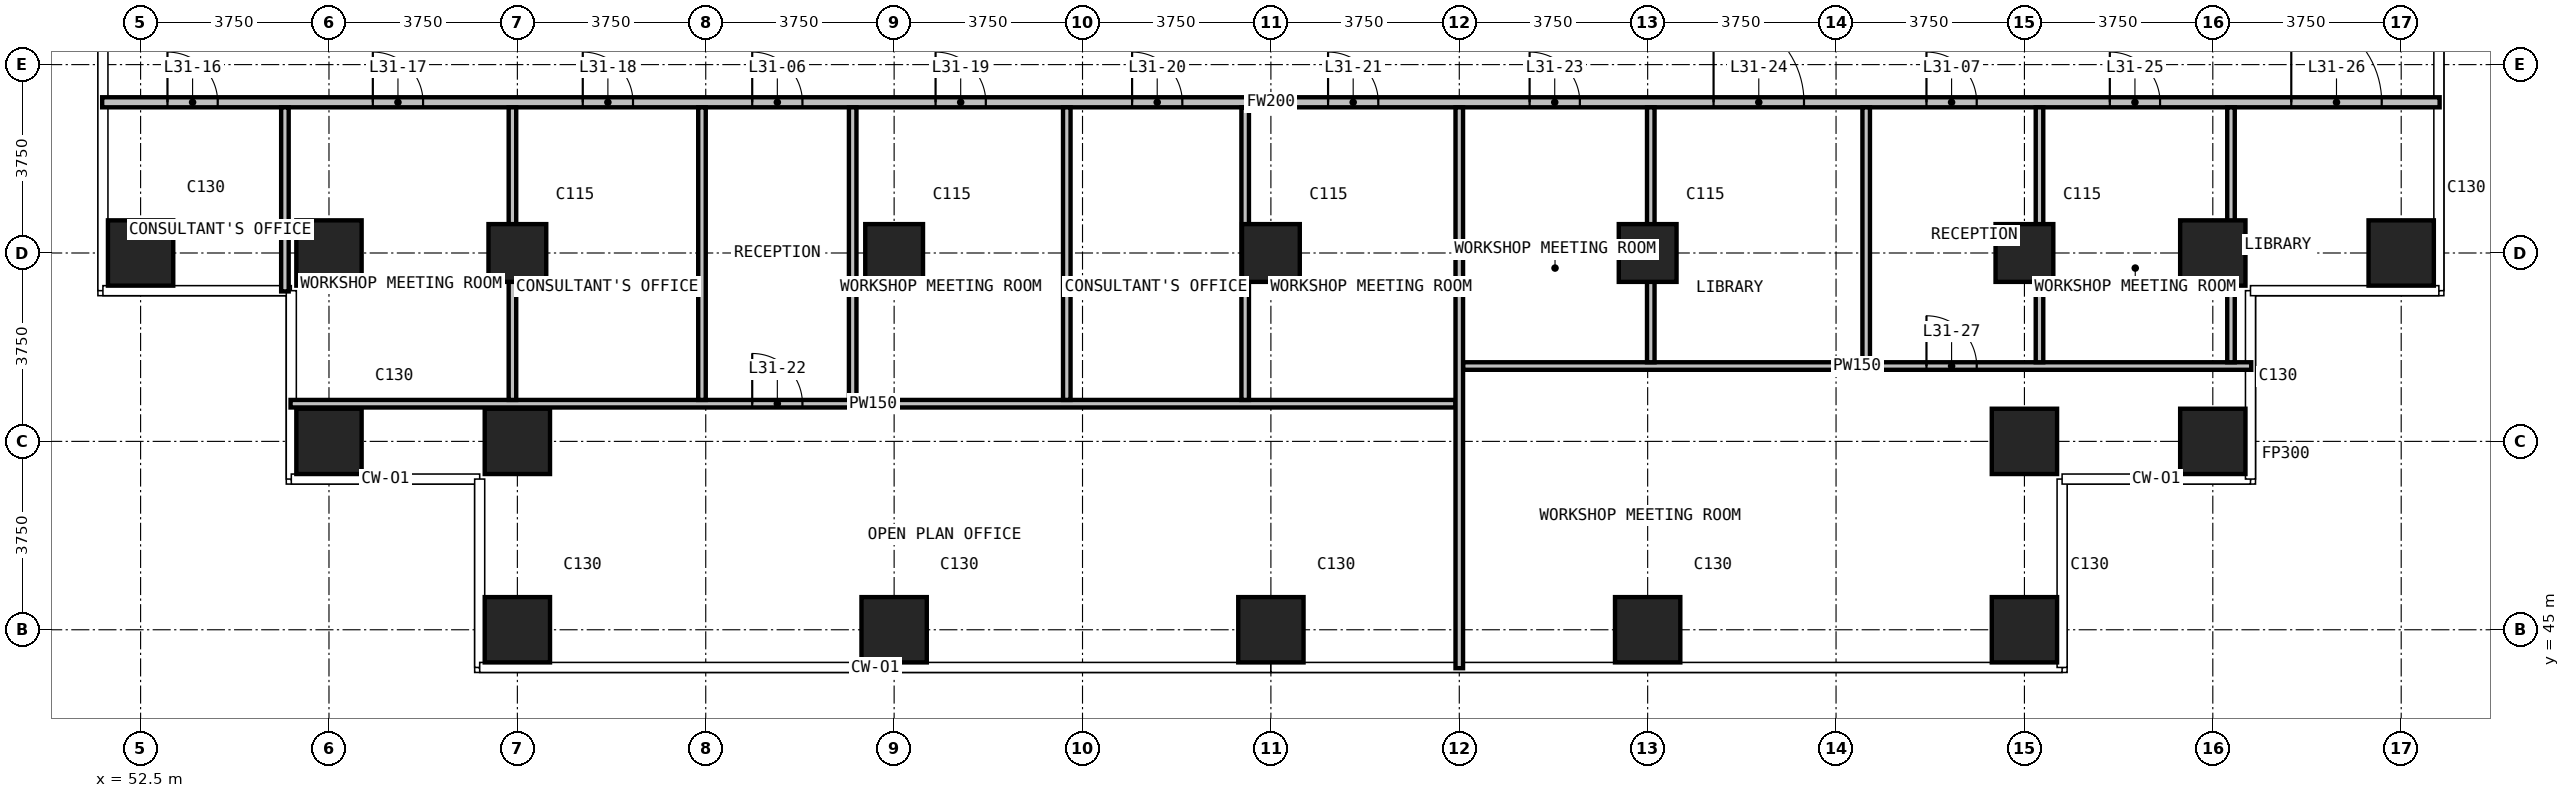
"""IFC4 building model, lengths in metres.
Left out: names, types, materials, properties, quantities, classifications, styles, units other than length and angle.
Written with IfcOpenShell. Run it as: python <this file> out.ifc"""

import sys

from ifc_helpers import new_model, si_unit, direction, frame, frame_2d, origin, origin_2d, place, context, subcontext, project, spatial, rectangle, extrude, element, fill, save


model = new_model("IFC4")
c1 = context("Model", 3, precision=1e-05, world=origin(), true_north=direction((0.0, 1.0)))
c2 = subcontext(c1, "Body", "Model", "MODEL_VIEW")
j1 = project(units=[si_unit("LENGTHUNIT", "METRE"), si_unit("PLANEANGLEUNIT", "RADIAN")], contexts=[c1])
p1 = place(None, origin())
s1 = spatial("IfcSite", under=j1, at=p1, CompositionType="ELEMENT")
p2 = place(p1, origin())
s2 = spatial("IfcBuilding", under=s1, at=p2, CompositionType="ELEMENT")
p3 = place(p2, frame((0.0, 0.0, 125.2)))
s3 = spatial("IfcBuildingStorey", under=s2, at=p3, CompositionType="ELEMENT", Elevation=125.2)
for number, where, z_axis, x_axis in (
    (1, (52.5, 52.5, 0.0), (0.0, 0.0, 1.0), (1.0, 0.0, 0.0)),
    (2, (56.25, 48.75, 0.0), (0.0, 0.0, 1.0), (1.0, 0.0, 0.0)),
    (3, (56.25, 52.5, 0.0), (0.0, 0.0, 1.0), (1.0, 0.0, 0.0)),
    (4, (60.0, 45.0, 0.0), (0.0, 0.0, 1.0), (1.0, 0.0, 0.0)),
    (5, (60.0, 48.75, 0.0), (0.0, 0.0, 1.0), (1.0, 0.0, 0.0)),
):
    element("IfcColumn", number, at=place(p3, frame(where, z_axis=z_axis, x_axis=x_axis)), inside=s3, PredefinedType="COLUMN", context=c2, shape_type="SweptSolid", body=[
        extrude(rectangle(XDim=1.3, YDim=1.3, at=origin_2d()), origin(), (0.0, 0.0, 1.0), 3.6),
    ])
p4 = place(p3, frame((60.0, 52.5, 0.0), z_axis=(0.0, 0.0, 1.0), x_axis=(1.0, 0.0, 0.0)))
e6 = element("IfcColumn", 6, at=p4, inside=s3, PredefinedType="COLUMN", context=c2, shape_type="SweptSolid", body=[
    extrude(rectangle(XDim=1.15, YDim=1.15, at=origin_2d()), origin(), (0.0, 0.0, 1.0), 3.6),
])
p5 = place(p3, frame((67.5, 45.0, 0.0), z_axis=(0.0, 0.0, 1.0), x_axis=(1.0, 0.0, 0.0)))
e7 = element("IfcColumn", 7, at=p5, inside=s3, PredefinedType="COLUMN", context=c2, shape_type="SweptSolid", body=[
    extrude(rectangle(XDim=1.3, YDim=1.3, at=origin_2d()), origin(), (0.0, 0.0, 1.0), 3.6),
])
p6 = place(p3, frame((67.5, 52.5, 0.0), z_axis=(0.0, 0.0, 1.0), x_axis=(1.0, 0.0, 0.0)))
e8 = element("IfcColumn", 8, at=p6, inside=s3, PredefinedType="COLUMN", context=c2, shape_type="SweptSolid", body=[
    extrude(rectangle(XDim=1.15, YDim=1.15, at=origin_2d()), origin(), (0.0, 0.0, 1.0), 3.6),
])
p7 = place(p3, frame((75.0, 45.0, 0.0), z_axis=(0.0, 0.0, 1.0), x_axis=(1.0, 0.0, 0.0)))
e9 = element("IfcColumn", 9, at=p7, inside=s3, PredefinedType="COLUMN", context=c2, shape_type="SweptSolid", body=[
    extrude(rectangle(XDim=1.3, YDim=1.3, at=origin_2d()), origin(), (0.0, 0.0, 1.0), 3.6),
])
p8 = place(p3, frame((75.0, 52.5, 0.0), z_axis=(0.0, 0.0, 1.0), x_axis=(1.0, 0.0, 0.0)))
e10 = element("IfcColumn", 10, at=p8, inside=s3, PredefinedType="COLUMN", context=c2, shape_type="SweptSolid", body=[
    extrude(rectangle(XDim=1.15, YDim=1.15, at=origin_2d()), origin(), (0.0, 0.0, 1.0), 3.6),
])
p9 = place(p3, frame((82.5, 45.0, 0.0), z_axis=(0.0, 0.0, 1.0), x_axis=(1.0, 0.0, 0.0)))
e11 = element("IfcColumn", 11, at=p9, inside=s3, PredefinedType="COLUMN", context=c2, shape_type="SweptSolid", body=[
    extrude(rectangle(XDim=1.3, YDim=1.3, at=origin_2d()), origin(), (0.0, 0.0, 1.0), 3.6),
])
p10 = place(p3, frame((82.5, 52.5, 0.0), z_axis=(0.0, 0.0, 1.0), x_axis=(1.0, 0.0, 0.0)))
e12 = element("IfcColumn", 12, at=p10, inside=s3, PredefinedType="COLUMN", context=c2, shape_type="SweptSolid", body=[
    extrude(rectangle(XDim=1.15, YDim=1.15, at=origin_2d()), origin(), (0.0, 0.0, 1.0), 3.6),
])
for number, where, z_axis, x_axis in (
    (13, (90.0, 45.0, 0.0), (0.0, 0.0, 1.0), (1.0, 0.0, 0.0)),
    (14, (90.0, 48.75, 0.0), (0.0, 0.0, 1.0), (1.0, 0.0, 0.0)),
):
    element("IfcColumn", number, at=place(p3, frame(where, z_axis=z_axis, x_axis=x_axis)), inside=s3, PredefinedType="COLUMN", context=c2, shape_type="SweptSolid", body=[
        extrude(rectangle(XDim=1.3, YDim=1.3, at=origin_2d()), origin(), (0.0, 0.0, 1.0), 3.6),
    ])
p11 = place(p3, frame((90.0, 52.5, 0.0), z_axis=(0.0, 0.0, 1.0), x_axis=(1.0, 0.0, 0.0)))
e15 = element("IfcColumn", 15, at=p11, inside=s3, PredefinedType="COLUMN", context=c2, shape_type="SweptSolid", body=[
    extrude(rectangle(XDim=1.15, YDim=1.15, at=origin_2d()), origin(), (0.0, 0.0, 1.0), 3.6),
])
for number, where, z_axis, x_axis in (
    (16, (93.75, 48.75, 0.0), (0.0, 0.0, 1.0), (1.0, 0.0, 0.0)),
    (17, (93.75, 52.5, 0.0), (0.0, 0.0, 1.0), (1.0, 0.0, 0.0)),
    (18, (97.5, 52.5, 0.0), (0.0, 0.0, 1.0), (1.0, 0.0, 0.0)),
):
    element("IfcColumn", number, at=place(p3, frame(where, z_axis=z_axis, x_axis=x_axis)), inside=s3, PredefinedType="COLUMN", context=c2, shape_type="SweptSolid", body=[
        extrude(rectangle(XDim=1.3, YDim=1.3, at=origin_2d()), origin(), (0.0, 0.0, 1.0), 3.6),
    ])
p12 = place(p3, frame((51.735, 55.5, 0.0), z_axis=(0.0, 0.0, 1.0), x_axis=(1.0, 0.0, 0.0)))
e19 = element("IfcWall", 19, at=p12, inside=s3, PredefinedType="PARTITIONING", context=c2, shape_type="SweptSolid", body=[
    extrude(rectangle(XDim=46.53, YDim=0.2, at=frame_2d((23.265, 0.0))), origin(), (0.0, 0.0, 1.0), 3.3),
])
p13 = place(p12, frame((12.94, 0.0, 0.0)))
e20 = element("IfcOpeningElement", 20, at=p13, cuts=e19, PredefinedType="OPENING", context=c2, shape_type="SweptSolid", body=[
    extrude(rectangle(XDim=1.0, YDim=2.2, at=frame_2d((0.5, 1.1))), frame((0.0, 0.11, 0.0), z_axis=(0.0, -1.0, 0.0), x_axis=(1.0, 0.0, 0.0)), (0.0, 0.0, 1.0), 0.22),
])
p14 = place(p12, frame((36.315, 0.0, 0.0)))
e21 = element("IfcOpeningElement", 21, at=p14, cuts=e19, PredefinedType="OPENING", context=c2, shape_type="SweptSolid", body=[
    extrude(rectangle(XDim=1.0, YDim=2.2, at=frame_2d((0.5, 1.1))), frame((0.0, 0.11, 0.0), z_axis=(0.0, -1.0, 0.0), x_axis=(1.0, 0.0, 0.0)), (0.0, 0.0, 1.0), 0.22),
])
p15 = place(p12, frame((1.3, 0.0, 0.0)))
e22 = element("IfcOpeningElement", 22, at=p15, cuts=e19, PredefinedType="OPENING", context=c2, shape_type="SweptSolid", body=[
    extrude(rectangle(XDim=1.0, YDim=2.2, at=frame_2d((0.5, 1.1))), frame((0.0, 0.11, 0.0), z_axis=(0.0, -1.0, 0.0), x_axis=(1.0, 0.0, 0.0)), (0.0, 0.0, 1.0), 0.22),
])
p16 = place(p12, frame((5.388, 0.0, 0.0)))
e23 = element("IfcOpeningElement", 23, at=p16, cuts=e19, PredefinedType="OPENING", context=c2, shape_type="SweptSolid", body=[
    extrude(rectangle(XDim=1.0, YDim=2.2, at=frame_2d((0.5, 1.1))), frame((0.0, 0.11, 0.0), z_axis=(0.0, -1.0, 0.0), x_axis=(1.0, 0.0, 0.0)), (0.0, 0.0, 1.0), 0.22),
])
p17 = place(p12, frame((9.567, 0.0, 0.0)))
e24 = element("IfcOpeningElement", 24, at=p17, cuts=e19, PredefinedType="OPENING", context=c2, shape_type="SweptSolid", body=[
    extrude(rectangle(XDim=1.0, YDim=2.2, at=frame_2d((0.5, 1.1))), frame((0.0, 0.11, 0.0), z_axis=(0.0, -1.0, 0.0), x_axis=(1.0, 0.0, 0.0)), (0.0, 0.0, 1.0), 0.22),
])
p18 = place(p12, frame((16.59, 0.0, 0.0)))
e25 = element("IfcOpeningElement", 25, at=p18, cuts=e19, PredefinedType="OPENING", context=c2, shape_type="SweptSolid", body=[
    extrude(rectangle(XDim=1.0, YDim=2.2, at=frame_2d((0.5, 1.1))), frame((0.0, 0.11, 0.0), z_axis=(0.0, -1.0, 0.0), x_axis=(1.0, 0.0, 0.0)), (0.0, 0.0, 1.0), 0.22),
])
p19 = place(p12, frame((20.502, 0.0, 0.0)))
e26 = element("IfcOpeningElement", 26, at=p19, cuts=e19, PredefinedType="OPENING", context=c2, shape_type="SweptSolid", body=[
    extrude(rectangle(XDim=1.0, YDim=2.2, at=frame_2d((0.5, 1.1))), frame((0.0, 0.11, 0.0), z_axis=(0.0, -1.0, 0.0), x_axis=(1.0, 0.0, 0.0)), (0.0, 0.0, 1.0), 0.22),
])
p20 = place(p12, frame((24.403, 0.0, 0.0)))
e27 = element("IfcOpeningElement", 27, at=p20, cuts=e19, PredefinedType="OPENING", context=c2, shape_type="SweptSolid", body=[
    extrude(rectangle(XDim=1.0, YDim=2.2, at=frame_2d((0.5, 1.1))), frame((0.0, 0.11, 0.0), z_axis=(0.0, -1.0, 0.0), x_axis=(1.0, 0.0, 0.0)), (0.0, 0.0, 1.0), 0.22),
])
p21 = place(p12, frame((28.415, 0.0, 0.0)))
e28 = element("IfcOpeningElement", 28, at=p21, cuts=e19, PredefinedType="OPENING", context=c2, shape_type="SweptSolid", body=[
    extrude(rectangle(XDim=1.0, YDim=2.2, at=frame_2d((0.5, 1.1))), frame((0.0, 0.11, 0.0), z_axis=(0.0, -1.0, 0.0), x_axis=(1.0, 0.0, 0.0)), (0.0, 0.0, 1.0), 0.22),
])
p22 = place(p12, frame((32.077, 0.0, 0.0)))
e29 = element("IfcOpeningElement", 29, at=p22, cuts=e19, PredefinedType="OPENING", context=c2, shape_type="SweptSolid", body=[
    extrude(rectangle(XDim=1.8, YDim=2.2, at=frame_2d((0.9, 1.1))), frame((0.0, 0.11, 0.0), z_axis=(0.0, -1.0, 0.0), x_axis=(1.0, 0.0, 0.0)), (0.0, 0.0, 1.0), 0.22),
])
p23 = place(p12, frame((39.965, 0.0, 0.0)))
e30 = element("IfcOpeningElement", 30, at=p23, cuts=e19, PredefinedType="OPENING", context=c2, shape_type="SweptSolid", body=[
    extrude(rectangle(XDim=1.0, YDim=2.2, at=frame_2d((0.5, 1.1))), frame((0.0, 0.11, 0.0), z_axis=(0.0, -1.0, 0.0), x_axis=(1.0, 0.0, 0.0)), (0.0, 0.0, 1.0), 0.22),
])
p24 = place(p12, frame((43.577, 0.0, 0.0)))
e31 = element("IfcOpeningElement", 31, at=p24, cuts=e19, PredefinedType="OPENING", context=c2, shape_type="SweptSolid", body=[
    extrude(rectangle(XDim=1.8, YDim=2.2, at=frame_2d((0.9, 1.1))), frame((0.0, 0.11, 0.0), z_axis=(0.0, -1.0, 0.0), x_axis=(1.0, 0.0, 0.0)), (0.0, 0.0, 1.0), 0.22),
])
p25 = place(p3, frame((55.485, 49.5, 0.0), z_axis=(0.0, 0.0, 1.0), x_axis=(1.0, 0.0, 0.0)))
e32 = element("IfcWall", 32, at=p25, inside=s3, PredefinedType="PARTITIONING", context=c2, shape_type="SweptSolid", body=[
    extrude(rectangle(XDim=23.19, YDim=0.15, at=frame_2d((11.595, 0.0))), origin(), (0.0, 0.0, 1.0), 3.3),
])
p26 = place(p25, frame((9.19, 0.0, 0.0)))
e33 = element("IfcOpeningElement", 33, at=p26, cuts=e32, PredefinedType="OPENING", context=c2, shape_type="SweptSolid", body=[
    extrude(rectangle(XDim=1.0, YDim=2.2, at=frame_2d((0.5, 1.1))), frame((0.0, 0.085, 0.0), z_axis=(0.0, -1.0, 0.0), x_axis=(1.0, 0.0, 0.0)), (0.0, 0.0, 1.0), 0.17),
])
p27 = place(p3, frame((78.825, 50.25, 0.0), z_axis=(0.0, 0.0, 1.0), x_axis=(1.0, 0.0, 0.0)))
e34 = element("IfcWall", 34, at=p27, inside=s3, PredefinedType="PARTITIONING", context=c2, shape_type="SweptSolid", body=[
    extrude(rectangle(XDim=15.69, YDim=0.15, at=frame_2d((7.845, 0.0))), origin(), (0.0, 0.0, 1.0), 3.3),
])
p28 = place(p27, frame((9.225, 0.0, 0.0)))
e35 = element("IfcOpeningElement", 35, at=p28, cuts=e34, PredefinedType="OPENING", context=c2, shape_type="SweptSolid", body=[
    extrude(rectangle(XDim=1.0, YDim=2.2, at=frame_2d((0.5, 1.1))), frame((0.0, 0.085, 0.0), z_axis=(0.0, -1.0, 0.0), x_axis=(1.0, 0.0, 0.0)), (0.0, 0.0, 1.0), 0.17),
])
p29 = place(p3, frame((55.373, 51.735, 0.0), z_axis=(0.0, 0.0, 1.0), x_axis=(0.0, 1.0, 0.0)))
e36 = element("IfcWall", 36, at=p29, inside=s3, PredefinedType="PARTITIONING", context=c2, shape_type="SweptSolid", body=[
    extrude(rectangle(XDim=3.665, YDim=0.15, at=frame_2d((1.833, 0.0))), origin(), (0.0, 0.0, 1.0), 3.3),
])
for number, where, z_axis, x_axis in (
    (37, (59.902, 49.575, 0.0), (0.0, 0.0, 1.0), (0.0, 1.0, 0.0)),
    (38, (63.675, 49.575, 0.0), (0.0, 0.0, 1.0), (0.0, 1.0, 0.0)),
    (39, (66.675, 49.575, 0.0), (0.0, 0.0, 1.0), (0.0, 1.0, 0.0)),
    (40, (70.937, 49.575, 0.0), (0.0, 0.0, 1.0), (0.0, 1.0, 0.0)),
    (41, (74.488, 49.575, 0.0), (0.0, 0.0, 1.0), (0.0, 1.0, 0.0)),
):
    element("IfcWall", number, at=place(p3, frame(where, z_axis=z_axis, x_axis=x_axis)), inside=s3, PredefinedType="PARTITIONING", context=c2, shape_type="SweptSolid", body=[
        extrude(rectangle(XDim=5.825, YDim=0.15, at=frame_2d((2.913, 0.0))), origin(), (0.0, 0.0, 1.0), 3.3),
    ])
p30 = place(p3, frame((78.75, 44.235, 0.0), z_axis=(0.0, 0.0, 1.0), x_axis=(0.0, 1.0, 0.0)))
e42 = element("IfcWall", 42, at=p30, inside=s3, PredefinedType="PARTITIONING", context=c2, shape_type="SweptSolid", body=[
    extrude(rectangle(XDim=11.165, YDim=0.15, at=frame_2d((5.583, 0.0))), origin(), (0.0, 0.0, 1.0), 3.3),
])
for number, where, z_axis, x_axis in (
    (43, (82.562, 50.325, 0.0), (0.0, 0.0, 1.0), (0.0, 1.0, 0.0)),
    (44, (86.85, 50.325, 0.0), (0.0, 0.0, 1.0), (0.0, 1.0, 0.0)),
    (45, (90.3, 50.325, 0.0), (0.0, 0.0, 1.0), (0.0, 1.0, 0.0)),
    (46, (94.112, 50.325, 0.0), (0.0, 0.0, 1.0), (0.0, 1.0, 0.0)),
):
    element("IfcWall", number, at=place(p3, frame(where, z_axis=z_axis, x_axis=x_axis)), inside=s3, PredefinedType="PARTITIONING", context=c2, shape_type="SweptSolid", body=[
        extrude(rectangle(XDim=5.075, YDim=0.15, at=frame_2d((2.538, 0.0))), origin(), (0.0, 0.0, 1.0), 3.3),
    ])
p31 = place(p13, origin())
e47 = element("IfcDoor", 47, at=p31, inside=s3, OperationType="SINGLE_SWING_RIGHT", PredefinedType="DOOR", context=c2, shape_type="SweptSolid", body=[
    extrude(rectangle(XDim=1.0, YDim=2.2, at=frame_2d((0.5, 1.1))), frame((0.0, 0.025, 0.0), z_axis=(0.0, -1.0, 0.0), x_axis=(1.0, 0.0, 0.0)), (0.0, 0.0, 1.0), 0.05),
])
fill(e20, e47)
p32 = place(p14, origin())
e48 = element("IfcDoor", 48, at=p32, inside=s3, OperationType="SINGLE_SWING_LEFT", PredefinedType="DOOR", context=c2, shape_type="SweptSolid", body=[
    extrude(rectangle(XDim=1.0, YDim=2.2, at=frame_2d((0.5, 1.1))), frame((0.0, 0.025, 0.0), z_axis=(0.0, -1.0, 0.0), x_axis=(1.0, 0.0, 0.0)), (0.0, 0.0, 1.0), 0.05),
])
fill(e21, e48)
p33 = place(p15, origin())
e49 = element("IfcDoor", 49, at=p33, inside=s3, OperationType="SINGLE_SWING_LEFT", PredefinedType="DOOR", context=c2, shape_type="SweptSolid", body=[
    extrude(rectangle(XDim=1.0, YDim=2.2, at=frame_2d((0.5, 1.1))), frame((0.0, 0.025, 0.0), z_axis=(0.0, -1.0, 0.0), x_axis=(1.0, 0.0, 0.0)), (0.0, 0.0, 1.0), 0.05),
])
fill(e22, e49)
p34 = place(p16, origin())
e50 = element("IfcDoor", 50, at=p34, inside=s3, OperationType="SINGLE_SWING_RIGHT", PredefinedType="DOOR", context=c2, shape_type="SweptSolid", body=[
    extrude(rectangle(XDim=1.0, YDim=2.2, at=frame_2d((0.5, 1.1))), frame((0.0, 0.025, 0.0), z_axis=(0.0, -1.0, 0.0), x_axis=(1.0, 0.0, 0.0)), (0.0, 0.0, 1.0), 0.05),
])
fill(e23, e50)
p35 = place(p17, origin())
e51 = element("IfcDoor", 51, at=p35, inside=s3, OperationType="SINGLE_SWING_RIGHT", PredefinedType="DOOR", context=c2, shape_type="SweptSolid", body=[
    extrude(rectangle(XDim=1.0, YDim=2.2, at=frame_2d((0.5, 1.1))), frame((0.0, 0.025, 0.0), z_axis=(0.0, -1.0, 0.0), x_axis=(1.0, 0.0, 0.0)), (0.0, 0.0, 1.0), 0.05),
])
fill(e24, e51)
p36 = place(p18, origin())
e52 = element("IfcDoor", 52, at=p36, inside=s3, OperationType="SINGLE_SWING_LEFT", PredefinedType="DOOR", context=c2, shape_type="SweptSolid", body=[
    extrude(rectangle(XDim=1.0, YDim=2.2, at=frame_2d((0.5, 1.1))), frame((0.0, 0.025, 0.0), z_axis=(0.0, -1.0, 0.0), x_axis=(1.0, 0.0, 0.0)), (0.0, 0.0, 1.0), 0.05),
])
fill(e25, e52)
p37 = place(p19, origin())
e53 = element("IfcDoor", 53, at=p37, inside=s3, OperationType="SINGLE_SWING_LEFT", PredefinedType="DOOR", context=c2, shape_type="SweptSolid", body=[
    extrude(rectangle(XDim=1.0, YDim=2.2, at=frame_2d((0.5, 1.1))), frame((0.0, 0.025, 0.0), z_axis=(0.0, -1.0, 0.0), x_axis=(1.0, 0.0, 0.0)), (0.0, 0.0, 1.0), 0.05),
])
fill(e26, e53)
p38 = place(p20, origin())
e54 = element("IfcDoor", 54, at=p38, inside=s3, OperationType="SINGLE_SWING_LEFT", PredefinedType="DOOR", context=c2, shape_type="SweptSolid", body=[
    extrude(rectangle(XDim=1.0, YDim=2.2, at=frame_2d((0.5, 1.1))), frame((0.0, 0.025, 0.0), z_axis=(0.0, -1.0, 0.0), x_axis=(1.0, 0.0, 0.0)), (0.0, 0.0, 1.0), 0.05),
])
fill(e27, e54)
p39 = place(p26, origin())
e55 = element("IfcDoor", 55, at=p39, inside=s3, OperationType="SINGLE_SWING_LEFT", PredefinedType="DOOR", context=c2, shape_type="SweptSolid", body=[
    extrude(rectangle(XDim=1.0, YDim=2.2, at=frame_2d((0.5, 1.1))), frame((0.0, 0.025, 0.0), z_axis=(0.0, -1.0, 0.0), x_axis=(1.0, 0.0, 0.0)), (0.0, 0.0, 1.0), 0.05),
])
fill(e33, e55)
p40 = place(p21, origin())
e56 = element("IfcDoor", 56, at=p40, inside=s3, OperationType="SINGLE_SWING_LEFT", PredefinedType="DOOR", context=c2, shape_type="SweptSolid", body=[
    extrude(rectangle(XDim=1.0, YDim=2.2, at=frame_2d((0.5, 1.1))), frame((0.0, 0.025, 0.0), z_axis=(0.0, -1.0, 0.0), x_axis=(1.0, 0.0, 0.0)), (0.0, 0.0, 1.0), 0.05),
])
fill(e28, e56)
p41 = place(p22, origin())
e57 = element("IfcDoor", 57, at=p41, inside=s3, OperationType="DOUBLE_DOOR_SINGLE_SWING", PredefinedType="DOOR", context=c2, shape_type="SweptSolid", body=[
    extrude(rectangle(XDim=1.8, YDim=2.2, at=frame_2d((0.9, 1.1))), frame((0.0, 0.025, 0.0), z_axis=(0.0, -1.0, 0.0), x_axis=(1.0, 0.0, 0.0)), (0.0, 0.0, 1.0), 0.05),
])
fill(e29, e57)
p42 = place(p23, origin())
e58 = element("IfcDoor", 58, at=p42, inside=s3, OperationType="SINGLE_SWING_LEFT", PredefinedType="DOOR", context=c2, shape_type="SweptSolid", body=[
    extrude(rectangle(XDim=1.0, YDim=2.2, at=frame_2d((0.5, 1.1))), frame((0.0, 0.025, 0.0), z_axis=(0.0, -1.0, 0.0), x_axis=(1.0, 0.0, 0.0)), (0.0, 0.0, 1.0), 0.05),
])
fill(e30, e58)
p43 = place(p24, origin())
e59 = element("IfcDoor", 59, at=p43, inside=s3, OperationType="DOUBLE_DOOR_SINGLE_SWING", PredefinedType="DOOR", context=c2, shape_type="SweptSolid", body=[
    extrude(rectangle(XDim=1.8, YDim=2.2, at=frame_2d((0.9, 1.1))), frame((0.0, 0.025, 0.0), z_axis=(0.0, -1.0, 0.0), x_axis=(1.0, 0.0, 0.0)), (0.0, 0.0, 1.0), 0.05),
])
fill(e31, e59)
p44 = place(p28, origin())
e60 = element("IfcDoor", 60, at=p44, inside=s3, OperationType="SINGLE_SWING_LEFT", PredefinedType="DOOR", context=c2, shape_type="SweptSolid", body=[
    extrude(rectangle(XDim=1.0, YDim=2.2, at=frame_2d((0.5, 1.1))), frame((0.0, 0.025, 0.0), z_axis=(0.0, -1.0, 0.0), x_axis=(1.0, 0.0, 0.0)), (0.0, 0.0, 1.0), 0.05),
])
fill(e35, e60)
save(model, sys.argv[1])
